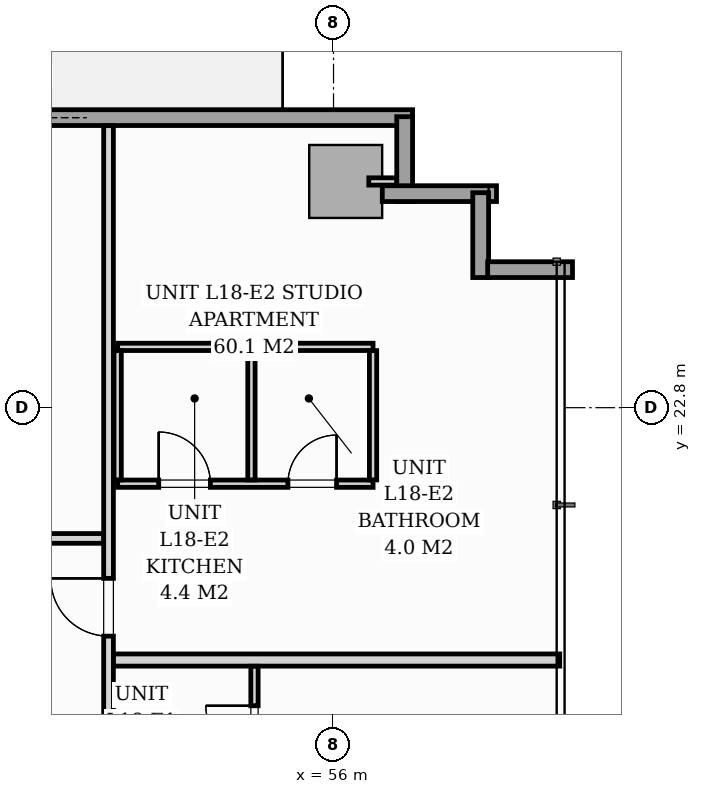
"""IFC4 building model, lengths in metres.
Left out: names, types, materials, properties, quantities, classifications, styles, units other than length and angle.
Written with IfcOpenShell. Run it as: python <this file> out.ifc"""

import sys

from ifc_helpers import new_model, si_unit, direction, frame, frame_2d, origin, origin_2d, place, context, subcontext, project, spatial, rectangle, extrude, source, transform, mapped, element, fill, save


model = new_model("IFC4")
c1 = context("Model", 3, precision=1e-05, world=origin(), true_north=direction((0.0, 1.0)))
c2 = subcontext(c1, "Body", "Model", "MODEL_VIEW")
j1 = project(units=[si_unit("LENGTHUNIT", "METRE"), si_unit("PLANEANGLEUNIT", "RADIAN")], contexts=[c1])
p1 = place(None, origin())
s1 = spatial("IfcSite", under=j1, at=p1, CompositionType="ELEMENT")
p2 = place(p1, origin())
s2 = spatial("IfcBuilding", under=s1, at=p2, CompositionType="ELEMENT")
p3 = place(p2, frame((0.0, 0.0, 64.6)))
s3 = spatial("IfcBuildingStorey", under=s2, at=p3, CompositionType="ELEMENT", Elevation=64.6)
m1 = source(origin(), c2, "Body", "SweptSolid", [
    extrude(rectangle(XDim=1.2, YDim=1.2, at=origin_2d()), origin(), (0.0, 0.0, 1.0), 3.194),
])
p4 = place(p3, frame((56.2, 26.52, 0.002), z_axis=(0.0, 0.0, 1.0), x_axis=(1.0, 0.0, 0.0)))
e1 = element("IfcColumn", 1, at=p4, inside=s3, PredefinedType="COLUMN", context=c2, shape_type="MappedRepresentation", body=[
    mapped(m1, transform((0.0, 0.0, 0.0), scale=1.0)),
])
p5 = place(p3, frame((40.15, 27.57, 0.0), z_axis=(0.0, 0.0, 1.0), x_axis=(1.0, 0.0, 0.0)))
e2 = element("IfcWall", 2, at=p5, inside=s3, PredefinedType="STANDARD", context=c2, shape_type="SweptSolid", body=[
    extrude(rectangle(XDim=17.15, YDim=0.26, at=frame_2d((8.575, 0.0))), origin(), (0.0, 0.0, 1.0), 2.9),
])
p6 = place(p5, frame((9.18, 0.0, 0.0)))
e3 = element("IfcOpeningElement", 3, at=p6, cuts=e2, PredefinedType="OPENING", context=c2, shape_type="SweptSolid", body=[
    extrude(rectangle(XDim=1.8, YDim=2.06, at=frame_2d((0.9, 1.03))), frame((0.0, 0.14, 0.0), z_axis=(0.0, -1.0, 0.0), x_axis=(1.0, 0.0, 0.0)), (0.0, 0.0, 1.0), 0.28),
])
p7 = place(p5, frame((0.7, 0.0, 0.65)))
e4 = element("IfcOpeningElement", 4, at=p7, cuts=e2, PredefinedType="OPENING", context=c2, shape_type="SweptSolid", body=[
    extrude(rectangle(XDim=1.6, YDim=1.5, at=frame_2d((0.8, 0.75))), frame((0.0, 0.14, 0.0), z_axis=(0.0, -1.0, 0.0), x_axis=(1.0, 0.0, 0.0)), (0.0, 0.0, 1.0), 0.28),
])
p8 = place(p3, frame((57.17, 27.585, 0.0), z_axis=(0.0, 0.0, 1.0), x_axis=(0.0, -1.0, 0.0)))
e5 = element("IfcWall", 5, at=p8, inside=s3, PredefinedType="STANDARD", context=c2, shape_type="SweptSolid", body=[
    extrude(rectangle(XDim=1.395, YDim=0.26, at=frame_2d((0.698, 0.0))), origin(), (0.0, 0.0, 1.0), 2.9),
])
p9 = place(p3, frame((56.802, 26.32, 0.0), z_axis=(0.0, 0.0, 1.0), x_axis=(1.0, 0.0, 0.0)))
e6 = element("IfcWall", 6, at=p9, inside=s3, PredefinedType="STANDARD", context=c2, shape_type="SweptSolid", body=[
    extrude(rectangle(XDim=1.878, YDim=0.26, at=frame_2d((0.939, 0.0))), origin(), (0.0, 0.0, 1.0), 2.9),
])
for number, where, z_axis, x_axis in (
    (7, (58.42, 26.335, 0.0), (0.0, 0.0, 1.0), (0.0, -1.0, 0.0)),
    (8, (58.535, 25.07, 0.0), (0.0, 0.0, 1.0), (1.0, 0.0, 0.0)),
):
    element("IfcWall", number, at=place(p3, frame(where, z_axis=z_axis, x_axis=x_axis)), inside=s3, PredefinedType="STANDARD", context=c2, shape_type="SweptSolid", body=[
        extrude(rectangle(XDim=1.395, YDim=0.26, at=frame_2d((0.698, 0.0))), origin(), (0.0, 0.0, 1.0), 2.9),
    ])
p10 = place(p3, frame((52.3, 12.572, 0.0), z_axis=(0.0, 0.0, 1.0), x_axis=(0.0, 1.0, 0.0)))
e9 = element("IfcWall", 9, at=p10, inside=s3, PredefinedType="PARTITIONING", context=c2, shape_type="SweptSolid", body=[
    extrude(rectangle(XDim=14.866, YDim=0.16, at=frame_2d((7.433, 0.0))), origin(), (0.0, 0.0, 1.0), 2.9),
])
p11 = place(p10, frame((0.493, 0.0, 0.0)))
e10 = element("IfcOpeningElement", 10, at=p11, cuts=e9, PredefinedType="OPENING", context=c2, shape_type="SweptSolid", body=[
    extrude(rectangle(XDim=0.95, YDim=2.06, at=frame_2d((0.475, 1.03))), frame((0.0, 0.09, 0.0), z_axis=(0.0, -1.0, 0.0), x_axis=(1.0, 0.0, 0.0)), (0.0, 0.0, 1.0), 0.18),
])
p12 = place(p10, frame((6.471, 0.0, 0.0)))
e11 = element("IfcOpeningElement", 11, at=p12, cuts=e9, PredefinedType="OPENING", context=c2, shape_type="SweptSolid", body=[
    extrude(rectangle(XDim=0.95, YDim=2.06, at=frame_2d((0.475, 1.03))), frame((0.0, 0.09, 0.0), z_axis=(0.0, -1.0, 0.0), x_axis=(1.0, 0.0, 0.0)), (0.0, 0.0, 1.0), 0.18),
])
p13 = place(p3, frame((52.382, 18.65, 0.0), z_axis=(0.0, 0.0, 1.0), x_axis=(1.0, 0.0, 0.0)))
e12 = element("IfcWall", 12, at=p13, inside=s3, PredefinedType="PARTITIONING", context=c2, shape_type="SweptSolid", body=[
    extrude(rectangle(XDim=7.338, YDim=0.2, at=frame_2d((3.669, 0.0))), origin(), (0.0, 0.0, 1.0), 2.9),
])
p14 = place(p3, frame((54.7, 14.34, 0.0), z_axis=(0.0, 0.0, 1.0), x_axis=(0.0, 1.0, 0.0)))
e13 = element("IfcWall", 13, at=p14, inside=s3, PredefinedType="PARTITIONING", context=c2, shape_type="SweptSolid", body=[
    extrude(rectangle(XDim=4.208, YDim=0.12, at=frame_2d((2.104, 0.0))), origin(), (0.0, 0.0, 1.0), 2.005),
])
p15 = place(p14, frame((0.628, 0.0, 0.0)))
e14 = element("IfcOpeningElement", 14, at=p15, cuts=e13, PredefinedType="OPENING", context=c2, shape_type="SweptSolid", body=[
    extrude(rectangle(XDim=0.8, YDim=2.0, at=frame_2d((0.4, 1.0))), frame((0.0, 0.07, 0.0), z_axis=(0.0, -1.0, 0.0), x_axis=(1.0, 0.0, 0.0)), (0.0, 0.0, 1.0), 0.14),
])
p16 = place(p14, frame((2.758, 0.0, 0.0)))
e15 = element("IfcOpeningElement", 15, at=p16, cuts=e13, PredefinedType="OPENING", context=c2, shape_type="SweptSolid", body=[
    extrude(rectangle(XDim=0.8, YDim=2.0, at=frame_2d((0.4, 1.0))), frame((0.0, 0.07, 0.0), z_axis=(0.0, -1.0, 0.0), x_axis=(1.0, 0.0, 0.0)), (0.0, 0.0, 1.0), 0.14),
])
p17 = place(p3, frame((52.45, 21.55, 0.0), z_axis=(0.0, 0.0, 1.0), x_axis=(1.0, 0.0, 0.0)))
e16 = element("IfcWall", 16, at=p17, inside=s3, PredefinedType="PARTITIONING", context=c2, shape_type="SweptSolid", body=[
    extrude(rectangle(XDim=4.2, YDim=0.12, at=frame_2d((2.1, 0.0))), origin(), (0.0, 0.0, 1.0), 2.9),
])
p18 = place(p17, frame((0.675, 0.0, 0.0)))
e17 = element("IfcOpeningElement", 17, at=p18, cuts=e16, PredefinedType="OPENING", context=c2, shape_type="SweptSolid", body=[
    extrude(rectangle(XDim=0.85, YDim=2.05, at=frame_2d((0.425, 1.025))), frame((0.0, 0.07, 0.0), z_axis=(0.0, -1.0, 0.0), x_axis=(1.0, 0.0, 0.0)), (0.0, 0.0, 1.0), 0.14),
])
p19 = place(p17, frame((2.8, 0.0, 0.0)))
e18 = element("IfcOpeningElement", 18, at=p19, cuts=e16, PredefinedType="OPENING", context=c2, shape_type="SweptSolid", body=[
    extrude(rectangle(XDim=0.8, YDim=2.0, at=frame_2d((0.4, 1.0))), frame((0.0, 0.07, 0.0), z_axis=(0.0, -1.0, 0.0), x_axis=(1.0, 0.0, 0.0)), (0.0, 0.0, 1.0), 0.14),
])
p20 = place(p3, frame((52.45, 23.8, 0.0), z_axis=(0.0, 0.0, 1.0), x_axis=(1.0, 0.0, 0.0)))
e19 = element("IfcWall", 19, at=p20, inside=s3, PredefinedType="PARTITIONING", context=c2, shape_type="SweptSolid", body=[
    extrude(rectangle(XDim=4.2, YDim=0.12, at=frame_2d((2.1, 0.0))), origin(), (0.0, 0.0, 1.0), 2.9),
])
for number, where, z_axis, x_axis in (
    (20, (52.45, 21.612, 0.0), (0.0, 0.0, 1.0), (0.0, 1.0, 0.0)),
    (21, (54.65, 21.612, 0.0), (0.0, 0.0, 1.0), (0.0, 1.0, 0.0)),
    (22, (56.65, 21.612, 0.0), (0.0, 0.0, 1.0), (0.0, 1.0, 0.0)),
):
    element("IfcWall", number, at=place(p3, frame(where, z_axis=z_axis, x_axis=x_axis)), inside=s3, PredefinedType="PARTITIONING", context=c2, shape_type="SweptSolid", body=[
        extrude(rectangle(XDim=2.126, YDim=0.12, at=frame_2d((1.063, 0.0))), origin(), (0.0, 0.0, 1.0), 2.9),
    ])
p21 = place(p3, frame((50.432, 20.65, 0.0), z_axis=(0.0, 0.0, 1.0), x_axis=(1.0, 0.0, 0.0)))
e23 = element("IfcWall", 23, at=p21, inside=s3, PredefinedType="PARTITIONING", context=c2, shape_type="SweptSolid", body=[
    extrude(rectangle(XDim=1.786, YDim=0.16, at=frame_2d((0.893, 0.0))), origin(), (0.0, 0.0, 1.0), 2.9),
])
p22 = place(p3, frame((56.58, 26.52, 0.0), z_axis=(0.0, 0.0, 1.0), x_axis=(1.0, 0.0, 0.0)))
e24 = element("IfcWall", 24, at=p22, inside=s3, PredefinedType="PARTITIONING", context=c2, shape_type="SweptSolid", body=[
    extrude(rectangle(XDim=0.458, YDim=0.12, at=frame_2d((0.229, 0.0))), origin(), (0.0, 0.0, 1.0), 2.9),
])
m2 = source(origin(), c2, "Body", "SweptSolid", [
    extrude(rectangle(XDim=0.8, YDim=2.0, at=frame_2d((0.4, 1.0))), frame((0.0, 0.025, 0.0), z_axis=(0.0, -1.0, 0.0), x_axis=(1.0, 0.0, 0.0)), (0.0, 0.0, 1.0), 0.05),
])
p23 = place(p16, origin())
e25 = element("IfcDoor", 25, at=p23, inside=s3, OperationType="SINGLE_SWING_RIGHT", PredefinedType="DOOR", context=c2, shape_type="MappedRepresentation", body=[
    mapped(m2, transform((0.0, 0.0, 0.0), scale=1.0)),
])
fill(e15, e25)
m3 = source(origin(), c2, "Body", "SweptSolid", [
    extrude(rectangle(XDim=0.95, YDim=2.06, at=frame_2d((0.475, 1.03))), frame((0.0, 0.025, 0.0), z_axis=(0.0, -1.0, 0.0), x_axis=(1.0, 0.0, 0.0)), (0.0, 0.0, 1.0), 0.05),
])
p24 = place(p12, origin())
e26 = element("IfcDoor", 26, at=p24, inside=s3, OperationType="SINGLE_SWING_RIGHT", PredefinedType="DOOR", context=c2, shape_type="MappedRepresentation", body=[
    mapped(m3, transform((0.0, 0.0, 0.0), scale=1.0)),
])
fill(e11, e26)
m4 = source(origin(), c2, "Body", "SweptSolid", [
    extrude(rectangle(XDim=0.85, YDim=2.05, at=frame_2d((0.425, 1.025))), frame((0.0, 0.025, 0.0), z_axis=(0.0, -1.0, 0.0), x_axis=(1.0, 0.0, 0.0)), (0.0, 0.0, 1.0), 0.05),
])
p25 = place(p18, origin())
e27 = element("IfcDoor", 27, at=p25, inside=s3, OperationType="SINGLE_SWING_LEFT", PredefinedType="DOOR", context=c2, shape_type="MappedRepresentation", body=[
    mapped(m4, transform((0.0, 0.0, 0.0), scale=1.0)),
])
fill(e17, e27)
p26 = place(p19, origin())
e28 = element("IfcDoor", 28, at=p26, inside=s3, OperationType="SINGLE_SWING_RIGHT", PredefinedType="DOOR", context=c2, shape_type="MappedRepresentation", body=[
    mapped(m2, transform((0.0, 0.0, 0.0), scale=1.0)),
])
fill(e18, e28)
save(model, sys.argv[1])
